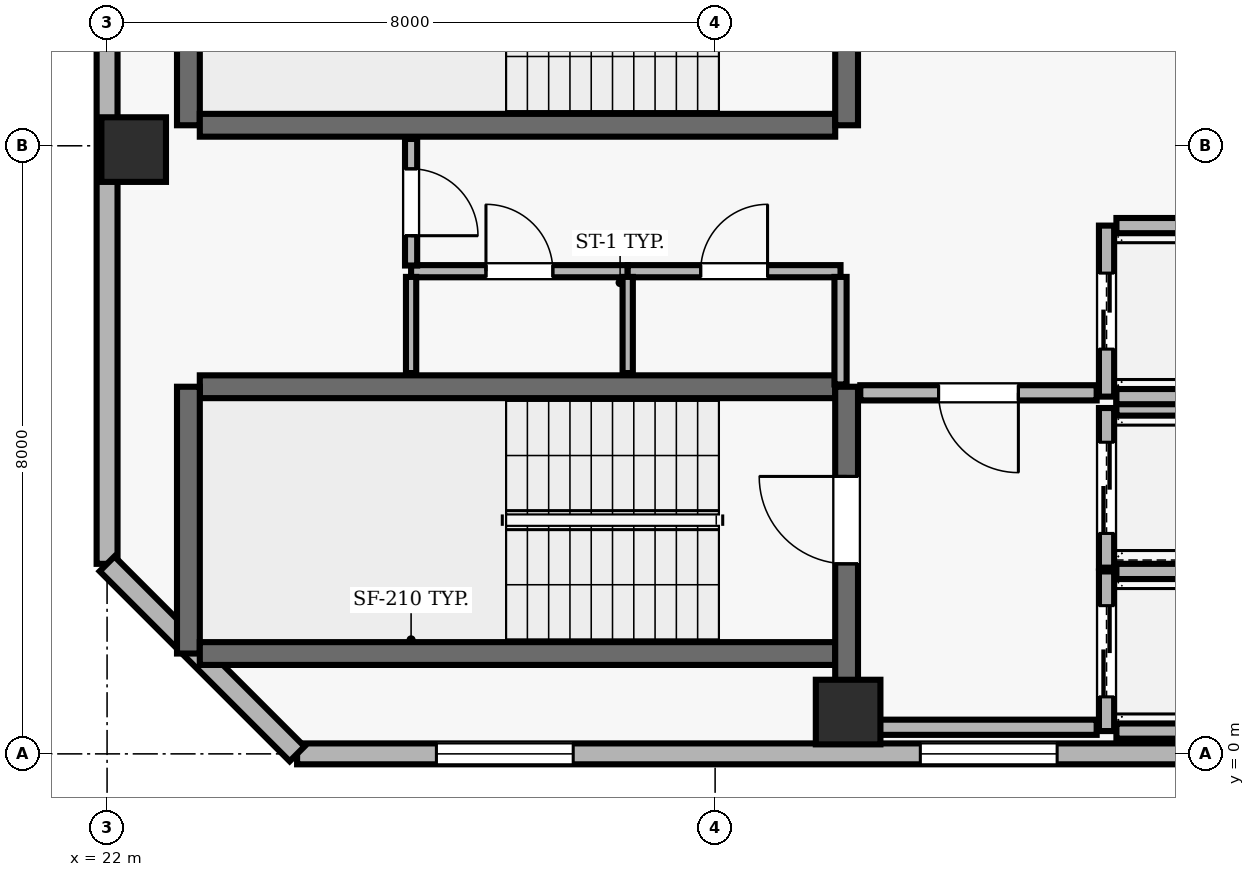
"""IFC4 building model, lengths in metres.
Left out: names, types, materials, properties, quantities, classifications, styles, units other than length and angle.
Written with IfcOpenShell. Run it as: python <this file> out.ifc"""

import sys

from ifc_helpers import new_model, si_unit, direction, frame, frame_2d, origin, origin_2d, place, context, subcontext, project, spatial, rectangle, extrude, element, fill, save


model = new_model("IFC4")
c1 = context("Model", 3, precision=1e-05, world=origin(), true_north=direction((0.0, 1.0)))
c2 = subcontext(c1, "Body", "Model", "MODEL_VIEW")
j1 = project(units=[si_unit("LENGTHUNIT", "METRE"), si_unit("PLANEANGLEUNIT", "RADIAN")], contexts=[c1])
p1 = place(None, origin())
s1 = spatial("IfcSite", under=j1, at=p1, CompositionType="ELEMENT")
p2 = place(p1, origin())
s2 = spatial("IfcBuilding", under=s1, at=p2, CompositionType="ELEMENT")
p3 = place(p2, frame((0.0, 0.0, 271.6)))
s3 = spatial("IfcBuildingStorey", under=s2, at=p3, CompositionType="ELEMENT", Elevation=271.6)
for number, where, z_axis, x_axis in (
    (1, (31.75, 0.55, 0.0), (0.0, 0.0, 1.0), (1.0, 0.0, 0.0)),
    (2, (22.35, 7.95, 0.0), (0.0, 0.0, 1.0), (1.0, 0.0, 0.0)),
):
    element("IfcColumn", number, at=place(p3, frame(where, z_axis=z_axis, x_axis=x_axis)), inside=s3, PredefinedType="COLUMN", context=c2, shape_type="SweptSolid", body=[
        extrude(rectangle(XDim=0.85, YDim=0.85, at=origin_2d()), origin(), (0.0, 0.0, 1.0), 3.9),
    ])
p4 = place(p3, frame((24.5, 0.0, 0.0), z_axis=(0.0, 0.0, 1.0), x_axis=(1.0, 0.0, 0.0)))
e3 = element("IfcWall", 3, at=p4, inside=s3, PredefinedType="SOLIDWALL", context=c2, shape_type="SweptSolid", body=[
    extrude(rectangle(XDim=32.8, YDim=0.275, at=frame_2d((16.4, 0.0))), origin(), (0.0, 0.0, 1.0), 3.69),
])
p5 = place(p4, frame((1.833, 0.0, 0.9)))
e4 = element("IfcOpeningElement", 4, at=p5, cuts=e3, PredefinedType="OPENING", context=c2, shape_type="SweptSolid", body=[
    extrude(rectangle(XDim=1.8, YDim=1.8, at=frame_2d((0.9, 0.9))), frame((0.0, 0.147, 0.0), z_axis=(0.0, -1.0, 0.0), x_axis=(1.0, 0.0, 0.0)), (0.0, 0.0, 1.0), 0.295),
])
p6 = place(p4, frame((8.2, 0.0, 0.9)))
e5 = element("IfcOpeningElement", 5, at=p6, cuts=e3, PredefinedType="OPENING", context=c2, shape_type="SweptSolid", body=[
    extrude(rectangle(XDim=1.8, YDim=1.8, at=frame_2d((0.9, 0.9))), frame((0.0, 0.147, 0.0), z_axis=(0.0, -1.0, 0.0), x_axis=(1.0, 0.0, 0.0)), (0.0, 0.0, 1.0), 0.295),
])
p7 = place(p4, frame((23.7, 0.0, 0.9)))
e6 = element("IfcOpeningElement", 6, at=p7, cuts=e3, PredefinedType="OPENING", context=c2, shape_type="SweptSolid", body=[
    extrude(rectangle(XDim=1.8, YDim=1.8, at=frame_2d((0.9, 0.9))), frame((0.0, 0.147, 0.0), z_axis=(0.0, -1.0, 0.0), x_axis=(1.0, 0.0, 0.0)), (0.0, 0.0, 1.0), 0.295),
])
p8 = place(p4, frame((29.167, 0.0, 0.9)))
e7 = element("IfcOpeningElement", 7, at=p8, cuts=e3, PredefinedType="OPENING", context=c2, shape_type="SweptSolid", body=[
    extrude(rectangle(XDim=1.8, YDim=1.8, at=frame_2d((0.9, 0.9))), frame((0.0, 0.147, 0.0), z_axis=(0.0, -1.0, 0.0), x_axis=(1.0, 0.0, 0.0)), (0.0, 0.0, 1.0), 0.295),
])
p9 = place(p3, frame((22.0, 35.3, 0.0), z_axis=(0.0, 0.0, 1.0), x_axis=(0.0, -1.0, 0.0)))
e8 = element("IfcWall", 8, at=p9, inside=s3, PredefinedType="SOLIDWALL", context=c2, shape_type="SweptSolid", body=[
    extrude(rectangle(XDim=32.8, YDim=0.275, at=frame_2d((16.4, 0.0))), origin(), (0.0, 0.0, 1.0), 3.69),
])
p10 = place(p9, frame((7.3, 0.0, 0.0)))
e9 = element("IfcOpeningElement", 9, at=p10, cuts=e8, PredefinedType="OPENING", context=c2, shape_type="SweptSolid", body=[
    extrude(rectangle(XDim=1.0, YDim=2.2, at=frame_2d((0.5, 1.1))), frame((0.0, 0.147, 0.0), z_axis=(0.0, -1.0, 0.0), x_axis=(1.0, 0.0, 0.0)), (0.0, 0.0, 1.0), 0.295),
])
p11 = place(p9, frame((0.933, 0.0, 0.9)))
e10 = element("IfcOpeningElement", 10, at=p11, cuts=e8, PredefinedType="OPENING", context=c2, shape_type="SweptSolid", body=[
    extrude(rectangle(XDim=1.8, YDim=1.8, at=frame_2d((0.9, 0.9))), frame((0.0, 0.147, 0.0), z_axis=(0.0, -1.0, 0.0), x_axis=(1.0, 0.0, 0.0)), (0.0, 0.0, 1.0), 0.295),
])
p12 = place(p9, frame((12.767, 0.0, 0.9)))
e11 = element("IfcOpeningElement", 11, at=p12, cuts=e8, PredefinedType="OPENING", context=c2, shape_type="SweptSolid", body=[
    extrude(rectangle(XDim=1.8, YDim=1.8, at=frame_2d((0.9, 0.9))), frame((0.0, 0.147, 0.0), z_axis=(0.0, -1.0, 0.0), x_axis=(1.0, 0.0, 0.0)), (0.0, 0.0, 1.0), 0.295),
])
p13 = place(p9, frame((18.233, 0.0, 0.9)))
e12 = element("IfcOpeningElement", 12, at=p13, cuts=e8, PredefinedType="OPENING", context=c2, shape_type="SweptSolid", body=[
    extrude(rectangle(XDim=1.8, YDim=1.8, at=frame_2d((0.9, 0.9))), frame((0.0, 0.147, 0.0), z_axis=(0.0, -1.0, 0.0), x_axis=(1.0, 0.0, 0.0)), (0.0, 0.0, 1.0), 0.295),
])
p14 = place(p9, frame((23.7, 0.0, 0.9)))
e13 = element("IfcOpeningElement", 13, at=p14, cuts=e8, PredefinedType="OPENING", context=c2, shape_type="SweptSolid", body=[
    extrude(rectangle(XDim=1.8, YDim=1.8, at=frame_2d((0.9, 0.9))), frame((0.0, 0.147, 0.0), z_axis=(0.0, -1.0, 0.0), x_axis=(1.0, 0.0, 0.0)), (0.0, 0.0, 1.0), 0.295),
])
p15 = place(p3, frame((22.0, 2.5, 0.0), z_axis=(0.0, 0.0, 1.0), x_axis=(0.707106781187, -0.707106781187, 0.0)))
e14 = element("IfcWall", 14, at=p15, inside=s3, PredefinedType="SOLIDWALL", context=c2, shape_type="SweptSolid", body=[
    extrude(rectangle(XDim=3.536, YDim=0.275, at=frame_2d((1.768, 0.0))), origin(), (0.0, 0.0, 1.0), 3.69),
])
p16 = place(p3, frame((31.58, 4.83, 0.0), z_axis=(0.0, 0.0, 1.0), x_axis=(-1.0, 0.0, 0.0)))
e15 = element("IfcWall", 15, at=p16, inside=s3, PredefinedType="SHEAR", context=c2, shape_type="SweptSolid", body=[
    extrude(rectangle(XDim=8.36, YDim=0.3, at=frame_2d((4.18, 0.0))), origin(), (0.0, 0.0, 1.0), 3.69),
])
p17 = place(p3, frame((23.07, 4.83, 0.0), z_axis=(0.0, 0.0, 1.0), x_axis=(0.0, -1.0, 0.0)))
e16 = element("IfcWall", 16, at=p17, inside=s3, PredefinedType="SHEAR", context=c2, shape_type="SweptSolid", body=[
    extrude(rectangle(XDim=3.51, YDim=0.3, at=frame_2d((1.755, 0.0))), origin(), (0.0, 0.0, 1.0), 3.69),
])
p18 = place(p3, frame((23.22, 1.32, 0.0), z_axis=(0.0, 0.0, 1.0), x_axis=(1.0, 0.0, 0.0)))
e17 = element("IfcWall", 17, at=p18, inside=s3, PredefinedType="SHEAR", context=c2, shape_type="SweptSolid", body=[
    extrude(rectangle(XDim=8.36, YDim=0.3, at=frame_2d((4.18, 0.0))), origin(), (0.0, 0.0, 1.0), 3.69),
])
p19 = place(p3, frame((31.73, 0.96, 0.0), z_axis=(0.0, 0.0, 1.0), x_axis=(0.0, 1.0, 0.0)))
e18 = element("IfcWall", 18, at=p19, inside=s3, PredefinedType="SHEAR", context=c2, shape_type="SweptSolid", body=[
    extrude(rectangle(XDim=3.87, YDim=0.3, at=frame_2d((1.935, 0.0))), origin(), (0.0, 0.0, 1.0), 3.69),
])
p20 = place(p19, frame((1.54, 0.0, 0.0)))
e19 = element("IfcOpeningElement", 19, at=p20, cuts=e18, PredefinedType="OPENING", context=c2, shape_type="SweptSolid", body=[
    extrude(rectangle(XDim=1.15, YDim=2.15, at=frame_2d((0.575, 1.075))), frame((0.0, 0.16, 0.0), z_axis=(0.0, -1.0, 0.0), x_axis=(1.0, 0.0, 0.0)), (0.0, 0.0, 1.0), 0.32),
])
p21 = place(p3, frame((23.07, 11.78, 0.0), z_axis=(0.0, 0.0, 1.0), x_axis=(0.0, -1.0, 0.0)))
e20 = element("IfcWall", 20, at=p21, inside=s3, PredefinedType="SHEAR", context=c2, shape_type="SweptSolid", body=[
    extrude(rectangle(XDim=3.51, YDim=0.3, at=frame_2d((1.755, 0.0))), origin(), (0.0, 0.0, 1.0), 3.69),
])
p22 = place(p3, frame((23.22, 8.27, 0.0), z_axis=(0.0, 0.0, 1.0), x_axis=(1.0, 0.0, 0.0)))
e21 = element("IfcWall", 21, at=p22, inside=s3, PredefinedType="SHEAR", context=c2, shape_type="SweptSolid", body=[
    extrude(rectangle(XDim=8.36, YDim=0.3, at=frame_2d((4.18, 0.0))), origin(), (0.0, 0.0, 1.0), 3.69),
])
p23 = place(p3, frame((31.73, 8.27, 0.0), z_axis=(0.0, 0.0, 1.0), x_axis=(0.0, 1.0, 0.0)))
e22 = element("IfcWall", 22, at=p23, inside=s3, PredefinedType="SHEAR", context=c2, shape_type="SweptSolid", body=[
    extrude(rectangle(XDim=3.51, YDim=0.3, at=frame_2d((1.755, 0.0))), origin(), (0.0, 0.0, 1.0), 3.69),
])
p24 = place(p23, frame((1.18, 0.0, 0.0)))
e23 = element("IfcOpeningElement", 23, at=p24, cuts=e22, PredefinedType="OPENING", context=c2, shape_type="SweptSolid", body=[
    extrude(rectangle(XDim=1.15, YDim=2.15, at=frame_2d((0.575, 1.075))), frame((0.0, 0.16, 0.0), z_axis=(0.0, -1.0, 0.0), x_axis=(1.0, 0.0, 0.0)), (0.0, 0.0, 1.0), 0.32),
])
p25 = place(p3, frame((35.15, 2.4, 0.0), z_axis=(0.0, 0.0, 1.0), x_axis=(0.0, -1.0, 0.0)))
e24 = element("IfcWall", 24, at=p25, inside=s3, PredefinedType="SOLIDWALL", context=c2, shape_type="SweptSolid", body=[
    extrude(rectangle(XDim=2.1, YDim=0.2, at=frame_2d((1.05, 0.0))), origin(), (0.0, 0.0, 1.0), 3.69),
])
p26 = place(p25, frame((0.45, 0.0, 0.0)))
e25 = element("IfcOpeningElement", 25, at=p26, cuts=e24, PredefinedType="OPENING", context=c2, shape_type="SweptSolid", body=[
    extrude(rectangle(XDim=1.2, YDim=2.15, at=frame_2d((0.6, 1.075))), frame((0.0, 0.11, 0.0), z_axis=(0.0, -1.0, 0.0), x_axis=(1.0, 0.0, 0.0)), (0.0, 0.0, 1.0), 0.22),
])
for number, where, z_axis, x_axis in (
    (26, (35.28, 0.3, 0.0), (0.0, 0.0, 1.0), (1.0, 0.0, 0.0)),
    (27, (37.42, 2.4, 0.0), (0.0, 0.0, 1.0), (-1.0, 0.0, 0.0)),
):
    element("IfcWall", number, at=place(p3, frame(where, z_axis=z_axis, x_axis=x_axis)), inside=s3, PredefinedType="SOLIDWALL", context=c2, shape_type="SweptSolid", body=[
        extrude(rectangle(XDim=2.14, YDim=0.2, at=frame_2d((1.07, 0.0))), origin(), (0.0, 0.0, 1.0), 3.69),
    ])
p27 = place(p3, frame((35.15, 4.55, 0.0), z_axis=(0.0, 0.0, 1.0), x_axis=(0.0, -1.0, 0.0)))
e28 = element("IfcWall", 28, at=p27, inside=s3, PredefinedType="SOLIDWALL", context=c2, shape_type="SweptSolid", body=[
    extrude(rectangle(XDim=2.1, YDim=0.2, at=frame_2d((1.05, 0.0))), origin(), (0.0, 0.0, 1.0), 3.69),
])
p28 = place(p27, frame((0.45, 0.0, 0.0)))
e29 = element("IfcOpeningElement", 29, at=p28, cuts=e28, PredefinedType="OPENING", context=c2, shape_type="SweptSolid", body=[
    extrude(rectangle(XDim=1.2, YDim=2.15, at=frame_2d((0.6, 1.075))), frame((0.0, 0.11, 0.0), z_axis=(0.0, -1.0, 0.0), x_axis=(1.0, 0.0, 0.0)), (0.0, 0.0, 1.0), 0.22),
])
p29 = place(p3, frame((37.42, 4.55, 0.0), z_axis=(0.0, 0.0, 1.0), x_axis=(-1.0, 0.0, 0.0)))
e30 = element("IfcWall", 30, at=p29, inside=s3, PredefinedType="SOLIDWALL", context=c2, shape_type="SweptSolid", body=[
    extrude(rectangle(XDim=2.14, YDim=0.2, at=frame_2d((1.07, 0.0))), origin(), (0.0, 0.0, 1.0), 3.69),
])
p30 = place(p3, frame((35.15, 6.95, 0.0), z_axis=(0.0, 0.0, 1.0), x_axis=(0.0, -1.0, 0.0)))
e31 = element("IfcWall", 31, at=p30, inside=s3, PredefinedType="SOLIDWALL", context=c2, shape_type="SweptSolid", body=[
    extrude(rectangle(XDim=2.25, YDim=0.2, at=frame_2d((1.125, 0.0))), origin(), (0.0, 0.0, 1.0), 3.69),
])
p31 = place(p30, frame((0.625, 0.0, 0.0)))
e32 = element("IfcOpeningElement", 32, at=p31, cuts=e31, PredefinedType="OPENING", context=c2, shape_type="SweptSolid", body=[
    extrude(rectangle(XDim=1.0, YDim=2.1, at=frame_2d((0.5, 1.05))), frame((0.0, 0.11, 0.0), z_axis=(0.0, -1.0, 0.0), x_axis=(1.0, 0.0, 0.0)), (0.0, 0.0, 1.0), 0.22),
])
for number, where, z_axis, x_axis in (
    (33, (35.28, 4.7, 0.0), (0.0, 0.0, 1.0), (1.0, 0.0, 0.0)),
    (34, (37.42, 6.95, 0.0), (0.0, 0.0, 1.0), (-1.0, 0.0, 0.0)),
):
    element("IfcWall", number, at=place(p3, frame(where, z_axis=z_axis, x_axis=x_axis)), inside=s3, PredefinedType="SOLIDWALL", context=c2, shape_type="SweptSolid", body=[
        extrude(rectangle(XDim=2.14, YDim=0.2, at=frame_2d((1.07, 0.0))), origin(), (0.0, 0.0, 1.0), 3.69),
    ])
p32 = place(p3, frame((26.0, 6.35, 0.0), z_axis=(0.0, 0.0, 1.0), x_axis=(1.0, 0.0, 0.0)))
e35 = element("IfcWall", 35, at=p32, inside=s3, PredefinedType="PARTITIONING", context=c2, shape_type="SweptSolid", body=[
    extrude(rectangle(XDim=2.85, YDim=0.16, at=frame_2d((1.425, 0.0))), origin(), (0.0, 0.0, 1.0), 3.69),
])
p33 = place(p32, frame((0.985, 0.0, 0.0)))
e36 = element("IfcOpeningElement", 36, at=p33, cuts=e35, PredefinedType="OPENING", context=c2, shape_type="SweptSolid", body=[
    extrude(rectangle(XDim=0.88, YDim=2.1, at=frame_2d((0.44, 1.05))), frame((0.0, 0.09, 0.0), z_axis=(0.0, -1.0, 0.0), x_axis=(1.0, 0.0, 0.0)), (0.0, 0.0, 1.0), 0.18),
])
p34 = place(p3, frame((28.85, 6.35, 0.0), z_axis=(0.0, 0.0, 1.0), x_axis=(1.0, 0.0, 0.0)))
e37 = element("IfcWall", 37, at=p34, inside=s3, PredefinedType="PARTITIONING", context=c2, shape_type="SweptSolid", body=[
    extrude(rectangle(XDim=2.8, YDim=0.16, at=frame_2d((1.4, 0.0))), origin(), (0.0, 0.0, 1.0), 3.69),
])
p35 = place(p34, frame((0.96, 0.0, 0.0)))
e38 = element("IfcOpeningElement", 38, at=p35, cuts=e37, PredefinedType="OPENING", context=c2, shape_type="SweptSolid", body=[
    extrude(rectangle(XDim=0.88, YDim=2.1, at=frame_2d((0.44, 1.05))), frame((0.0, 0.09, 0.0), z_axis=(0.0, -1.0, 0.0), x_axis=(1.0, 0.0, 0.0)), (0.0, 0.0, 1.0), 0.18),
])
p36 = place(p3, frame((31.65, 0.35, 0.0), z_axis=(0.0, 0.0, 1.0), x_axis=(1.0, 0.0, 0.0)))
e39 = element("IfcWall", 39, at=p36, inside=s3, PredefinedType="SOLIDWALL", context=c2, shape_type="SweptSolid", body=[
    extrude(rectangle(XDim=3.37, YDim=0.2, at=frame_2d((1.685, 0.0))), origin(), (0.0, 0.0, 1.0), 3.69),
])
p37 = place(p3, frame((35.02, 4.75, 0.0), z_axis=(0.0, 0.0, 1.0), x_axis=(-1.0, 0.0, 0.0)))
e40 = element("IfcWall", 40, at=p37, inside=s3, PredefinedType="SOLIDWALL", context=c2, shape_type="SweptSolid", body=[
    extrude(rectangle(XDim=3.11, YDim=0.2, at=frame_2d((1.555, 0.0))), origin(), (0.0, 0.0, 1.0), 3.69),
])
p38 = place(p37, frame((1.03, 0.0, 0.0)))
e41 = element("IfcOpeningElement", 41, at=p38, cuts=e40, PredefinedType="OPENING", context=c2, shape_type="SweptSolid", body=[
    extrude(rectangle(XDim=1.05, YDim=2.15, at=frame_2d((0.525, 1.075))), frame((0.0, 0.11, 0.0), z_axis=(0.0, -1.0, 0.0), x_axis=(1.0, 0.0, 0.0)), (0.0, 0.0, 1.0), 0.22),
])
p39 = place(p3, frame((26.0, 5.01, 0.0), z_axis=(0.0, 0.0, 1.0), x_axis=(0.0, 1.0, 0.0)))
e42 = element("IfcWall", 42, at=p39, inside=s3, PredefinedType="PARTITIONING", context=c2, shape_type="SweptSolid", body=[
    extrude(rectangle(XDim=1.265, YDim=0.135, at=frame_2d((0.632, 0.0))), origin(), (0.0, 0.0, 1.0), 3.69),
])
p40 = place(p3, frame((26.0, 8.09, 0.0), z_axis=(0.0, 0.0, 1.0), x_axis=(0.0, -1.0, 0.0)))
e43 = element("IfcWall", 43, at=p40, inside=s3, PredefinedType="PARTITIONING", context=c2, shape_type="SweptSolid", body=[
    extrude(rectangle(XDim=1.665, YDim=0.16, at=frame_2d((0.833, 0.0))), origin(), (0.0, 0.0, 1.0), 3.69),
])
p41 = place(p40, frame((0.393, 0.0, 0.0)))
e44 = element("IfcOpeningElement", 44, at=p41, cuts=e43, PredefinedType="OPENING", context=c2, shape_type="SweptSolid", body=[
    extrude(rectangle(XDim=0.88, YDim=2.1, at=frame_2d((0.44, 1.05))), frame((0.0, 0.09, 0.0), z_axis=(0.0, -1.0, 0.0), x_axis=(1.0, 0.0, 0.0)), (0.0, 0.0, 1.0), 0.18),
])
p42 = place(p3, frame((28.85, 5.01, 0.0), z_axis=(0.0, 0.0, 1.0), x_axis=(0.0, 1.0, 0.0)))
e45 = element("IfcWall", 45, at=p42, inside=s3, PredefinedType="PARTITIONING", context=c2, shape_type="SweptSolid", body=[
    extrude(rectangle(XDim=1.265, YDim=0.135, at=frame_2d((0.632, 0.0))), origin(), (0.0, 0.0, 1.0), 3.69),
])
p43 = place(p3, frame((31.65, 4.86, 0.0), z_axis=(0.0, 0.0, 1.0), x_axis=(0.0, 1.0, 0.0)))
e46 = element("IfcWall", 46, at=p43, inside=s3, PredefinedType="PARTITIONING", context=c2, shape_type="SweptSolid", body=[
    extrude(rectangle(XDim=1.415, YDim=0.16, at=frame_2d((0.708, 0.0))), origin(), (0.0, 0.0, 1.0), 3.69),
])
p44 = place(p5, origin())
e47 = element("IfcWindow", 47, at=p44, inside=s3, PartitioningType="SINGLE_PANEL", PredefinedType="WINDOW", context=c2, shape_type="SweptSolid", body=[
    extrude(rectangle(XDim=1.8, YDim=1.8, at=frame_2d((0.9, 0.9))), frame((0.0, 0.03, 0.0), z_axis=(0.0, -1.0, 0.0), x_axis=(1.0, 0.0, 0.0)), (0.0, 0.0, 1.0), 0.06),
])
fill(e4, e47)
p45 = place(p6, origin())
e48 = element("IfcWindow", 48, at=p45, inside=s3, PartitioningType="SINGLE_PANEL", PredefinedType="WINDOW", context=c2, shape_type="SweptSolid", body=[
    extrude(rectangle(XDim=1.8, YDim=1.8, at=frame_2d((0.9, 0.9))), frame((0.0, 0.03, 0.0), z_axis=(0.0, -1.0, 0.0), x_axis=(1.0, 0.0, 0.0)), (0.0, 0.0, 1.0), 0.06),
])
fill(e5, e48)
p46 = place(p20, origin())
e49 = element("IfcDoor", 49, at=p46, inside=s3, OperationType="SINGLE_SWING_RIGHT", PredefinedType="DOOR", context=c2, shape_type="SweptSolid", body=[
    extrude(rectangle(XDim=1.15, YDim=2.15, at=frame_2d((0.575, 1.075))), frame((0.0, 0.025, 0.0), z_axis=(0.0, -1.0, 0.0), x_axis=(1.0, 0.0, 0.0)), (0.0, 0.0, 1.0), 0.05),
])
fill(e19, e49)
p47 = place(p26, origin())
e50 = element("IfcDoor", 50, at=p47, inside=s3, OperationType="DOUBLE_DOOR_SLIDING", PredefinedType="DOOR", context=c2, shape_type="SweptSolid", body=[
    extrude(rectangle(XDim=1.2, YDim=2.15, at=frame_2d((0.6, 1.075))), frame((0.0, 0.025, 0.0), z_axis=(0.0, -1.0, 0.0), x_axis=(1.0, 0.0, 0.0)), (0.0, 0.0, 1.0), 0.05),
])
fill(e25, e50)
p48 = place(p28, origin())
e51 = element("IfcDoor", 51, at=p48, inside=s3, OperationType="DOUBLE_DOOR_SLIDING", PredefinedType="DOOR", context=c2, shape_type="SweptSolid", body=[
    extrude(rectangle(XDim=1.2, YDim=2.15, at=frame_2d((0.6, 1.075))), frame((0.0, 0.025, 0.0), z_axis=(0.0, -1.0, 0.0), x_axis=(1.0, 0.0, 0.0)), (0.0, 0.0, 1.0), 0.05),
])
fill(e29, e51)
p49 = place(p31, origin())
e52 = element("IfcDoor", 52, at=p49, inside=s3, OperationType="DOUBLE_DOOR_SLIDING", PredefinedType="DOOR", context=c2, shape_type="SweptSolid", body=[
    extrude(rectangle(XDim=1.0, YDim=2.1, at=frame_2d((0.5, 1.05))), frame((0.0, 0.025, 0.0), z_axis=(0.0, -1.0, 0.0), x_axis=(1.0, 0.0, 0.0)), (0.0, 0.0, 1.0), 0.05),
])
fill(e32, e52)
p50 = place(p38, origin())
e53 = element("IfcDoor", 53, at=p50, inside=s3, OperationType="SINGLE_SWING_LEFT", PredefinedType="DOOR", context=c2, shape_type="SweptSolid", body=[
    extrude(rectangle(XDim=1.05, YDim=2.15, at=frame_2d((0.525, 1.075))), frame((0.0, 0.025, 0.0), z_axis=(0.0, -1.0, 0.0), x_axis=(1.0, 0.0, 0.0)), (0.0, 0.0, 1.0), 0.05),
])
fill(e41, e53)
p51 = place(p41, origin())
e54 = element("IfcDoor", 54, at=p51, inside=s3, OperationType="SINGLE_SWING_RIGHT", PredefinedType="DOOR", context=c2, shape_type="SweptSolid", body=[
    extrude(rectangle(XDim=0.88, YDim=2.1, at=frame_2d((0.44, 1.05))), frame((0.0, 0.025, 0.0), z_axis=(0.0, -1.0, 0.0), x_axis=(1.0, 0.0, 0.0)), (0.0, 0.0, 1.0), 0.05),
])
fill(e44, e54)
p52 = place(p33, origin())
e55 = element("IfcDoor", 55, at=p52, inside=s3, OperationType="SINGLE_SWING_LEFT", PredefinedType="DOOR", context=c2, shape_type="SweptSolid", body=[
    extrude(rectangle(XDim=0.88, YDim=2.1, at=frame_2d((0.44, 1.05))), frame((0.0, 0.025, 0.0), z_axis=(0.0, -1.0, 0.0), x_axis=(1.0, 0.0, 0.0)), (0.0, 0.0, 1.0), 0.05),
])
fill(e36, e55)
p53 = place(p35, origin())
e56 = element("IfcDoor", 56, at=p53, inside=s3, OperationType="SINGLE_SWING_RIGHT", PredefinedType="DOOR", context=c2, shape_type="SweptSolid", body=[
    extrude(rectangle(XDim=0.88, YDim=2.1, at=frame_2d((0.44, 1.05))), frame((0.0, 0.025, 0.0), z_axis=(0.0, -1.0, 0.0), x_axis=(1.0, 0.0, 0.0)), (0.0, 0.0, 1.0), 0.05),
])
fill(e38, e56)
save(model, sys.argv[1])
